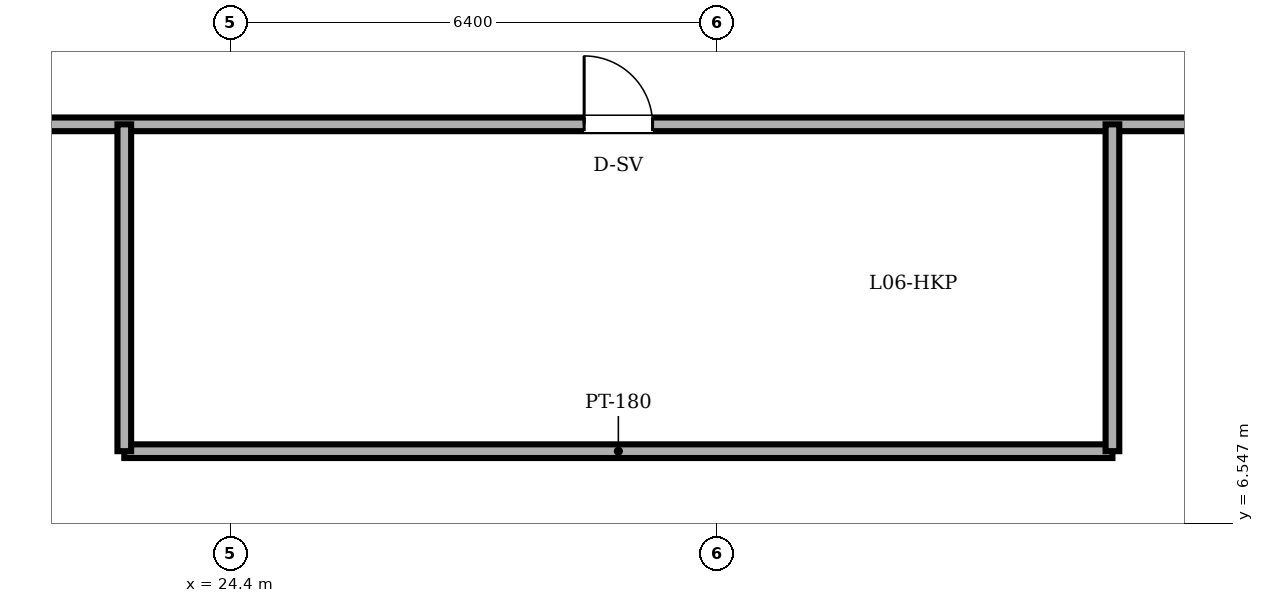
"""IFC4 building model, lengths in metres.
Left out: names, types, materials, properties, quantities, classifications, styles, units other than length and angle.
Written with IfcOpenShell. Run it as: python <this file> out.ifc"""

import sys

from ifc_helpers import new_model, si_unit, direction, frame, frame_2d, origin, place, context, subcontext, project, spatial, rectangle, extrude, element, fill, save


model = new_model("IFC4")
c1 = context("Model", 3, precision=1e-05, world=origin(), true_north=direction((0.0, 1.0)))
c2 = subcontext(c1, "Body", "Model", "MODEL_VIEW")
j1 = project(units=[si_unit("LENGTHUNIT", "METRE"), si_unit("PLANEANGLEUNIT", "RADIAN")], contexts=[c1])
p1 = place(None, origin())
s1 = spatial("IfcSite", under=j1, at=p1, CompositionType="ELEMENT")
p2 = place(p1, origin())
s2 = spatial("IfcBuilding", under=s1, at=p2, CompositionType="ELEMENT")
p3 = place(p2, frame((0.0, 0.0, 24.0)))
s3 = spatial("IfcBuildingStorey", under=s2, at=p3, CompositionType="ELEMENT", Elevation=24.0)
p4 = place(p3, frame((23.0, 7.5, 0.0), z_axis=(0.0, 0.0, 1.0), x_axis=(1.0, 0.0, 0.0)))
e1 = element("IfcWall", 1, at=p4, inside=s3, PredefinedType="PARTITIONING", context=c2, shape_type="SweptSolid", body=[
    extrude(rectangle(XDim=13.0, YDim=0.18, at=frame_2d((6.5, 0.0))), origin(), (0.0, 0.0, 1.0), 4.6),
])
p5 = place(p3, frame((11.0, 11.8, 0.0), z_axis=(0.0, 0.0, 1.0), x_axis=(1.0, 0.0, 0.0)))
e2 = element("IfcWall", 2, at=p5, inside=s3, PredefinedType="PARTITIONING", context=c2, shape_type="SweptSolid", body=[
    extrude(rectangle(XDim=28.9, YDim=0.18, at=frame_2d((14.45, 0.0))), origin(), (0.0, 0.0, 1.0), 4.6),
])
p6 = place(p5, frame((18.05, 0.0, 0.0)))
e3 = element("IfcOpeningElement", 3, at=p6, cuts=e2, PredefinedType="OPENING", context=c2, shape_type="SweptSolid", body=[
    extrude(rectangle(XDim=0.9, YDim=2.05, at=frame_2d((0.45, 1.025))), frame((0.0, 0.1, 0.0), z_axis=(0.0, -1.0, 0.0), x_axis=(1.0, 0.0, 0.0)), (0.0, 0.0, 1.0), 0.2),
])
for number, where, z_axis, x_axis in (
    (4, (23.0, 7.5, 0.0), (0.0, 0.0, 1.0), (0.0, 1.0, 0.0)),
    (5, (36.0, 7.5, 0.0), (0.0, 0.0, 1.0), (0.0, 1.0, 0.0)),
):
    element("IfcWall", number, at=place(p3, frame(where, z_axis=z_axis, x_axis=x_axis)), inside=s3, PredefinedType="PARTITIONING", context=c2, shape_type="SweptSolid", body=[
        extrude(rectangle(XDim=4.3, YDim=0.18, at=frame_2d((2.15, 0.0))), origin(), (0.0, 0.0, 1.0), 4.6),
    ])
p7 = place(p6, origin())
e6 = element("IfcDoor", 6, at=p7, inside=s3, OperationType="SINGLE_SWING_LEFT", PredefinedType="DOOR", context=c2, shape_type="SweptSolid", body=[
    extrude(rectangle(XDim=0.9, YDim=2.05, at=frame_2d((0.45, 1.025))), frame((0.0, 0.025, 0.0), z_axis=(0.0, -1.0, 0.0), x_axis=(1.0, 0.0, 0.0)), (0.0, 0.0, 1.0), 0.05),
])
fill(e3, e6)
save(model, sys.argv[1])
